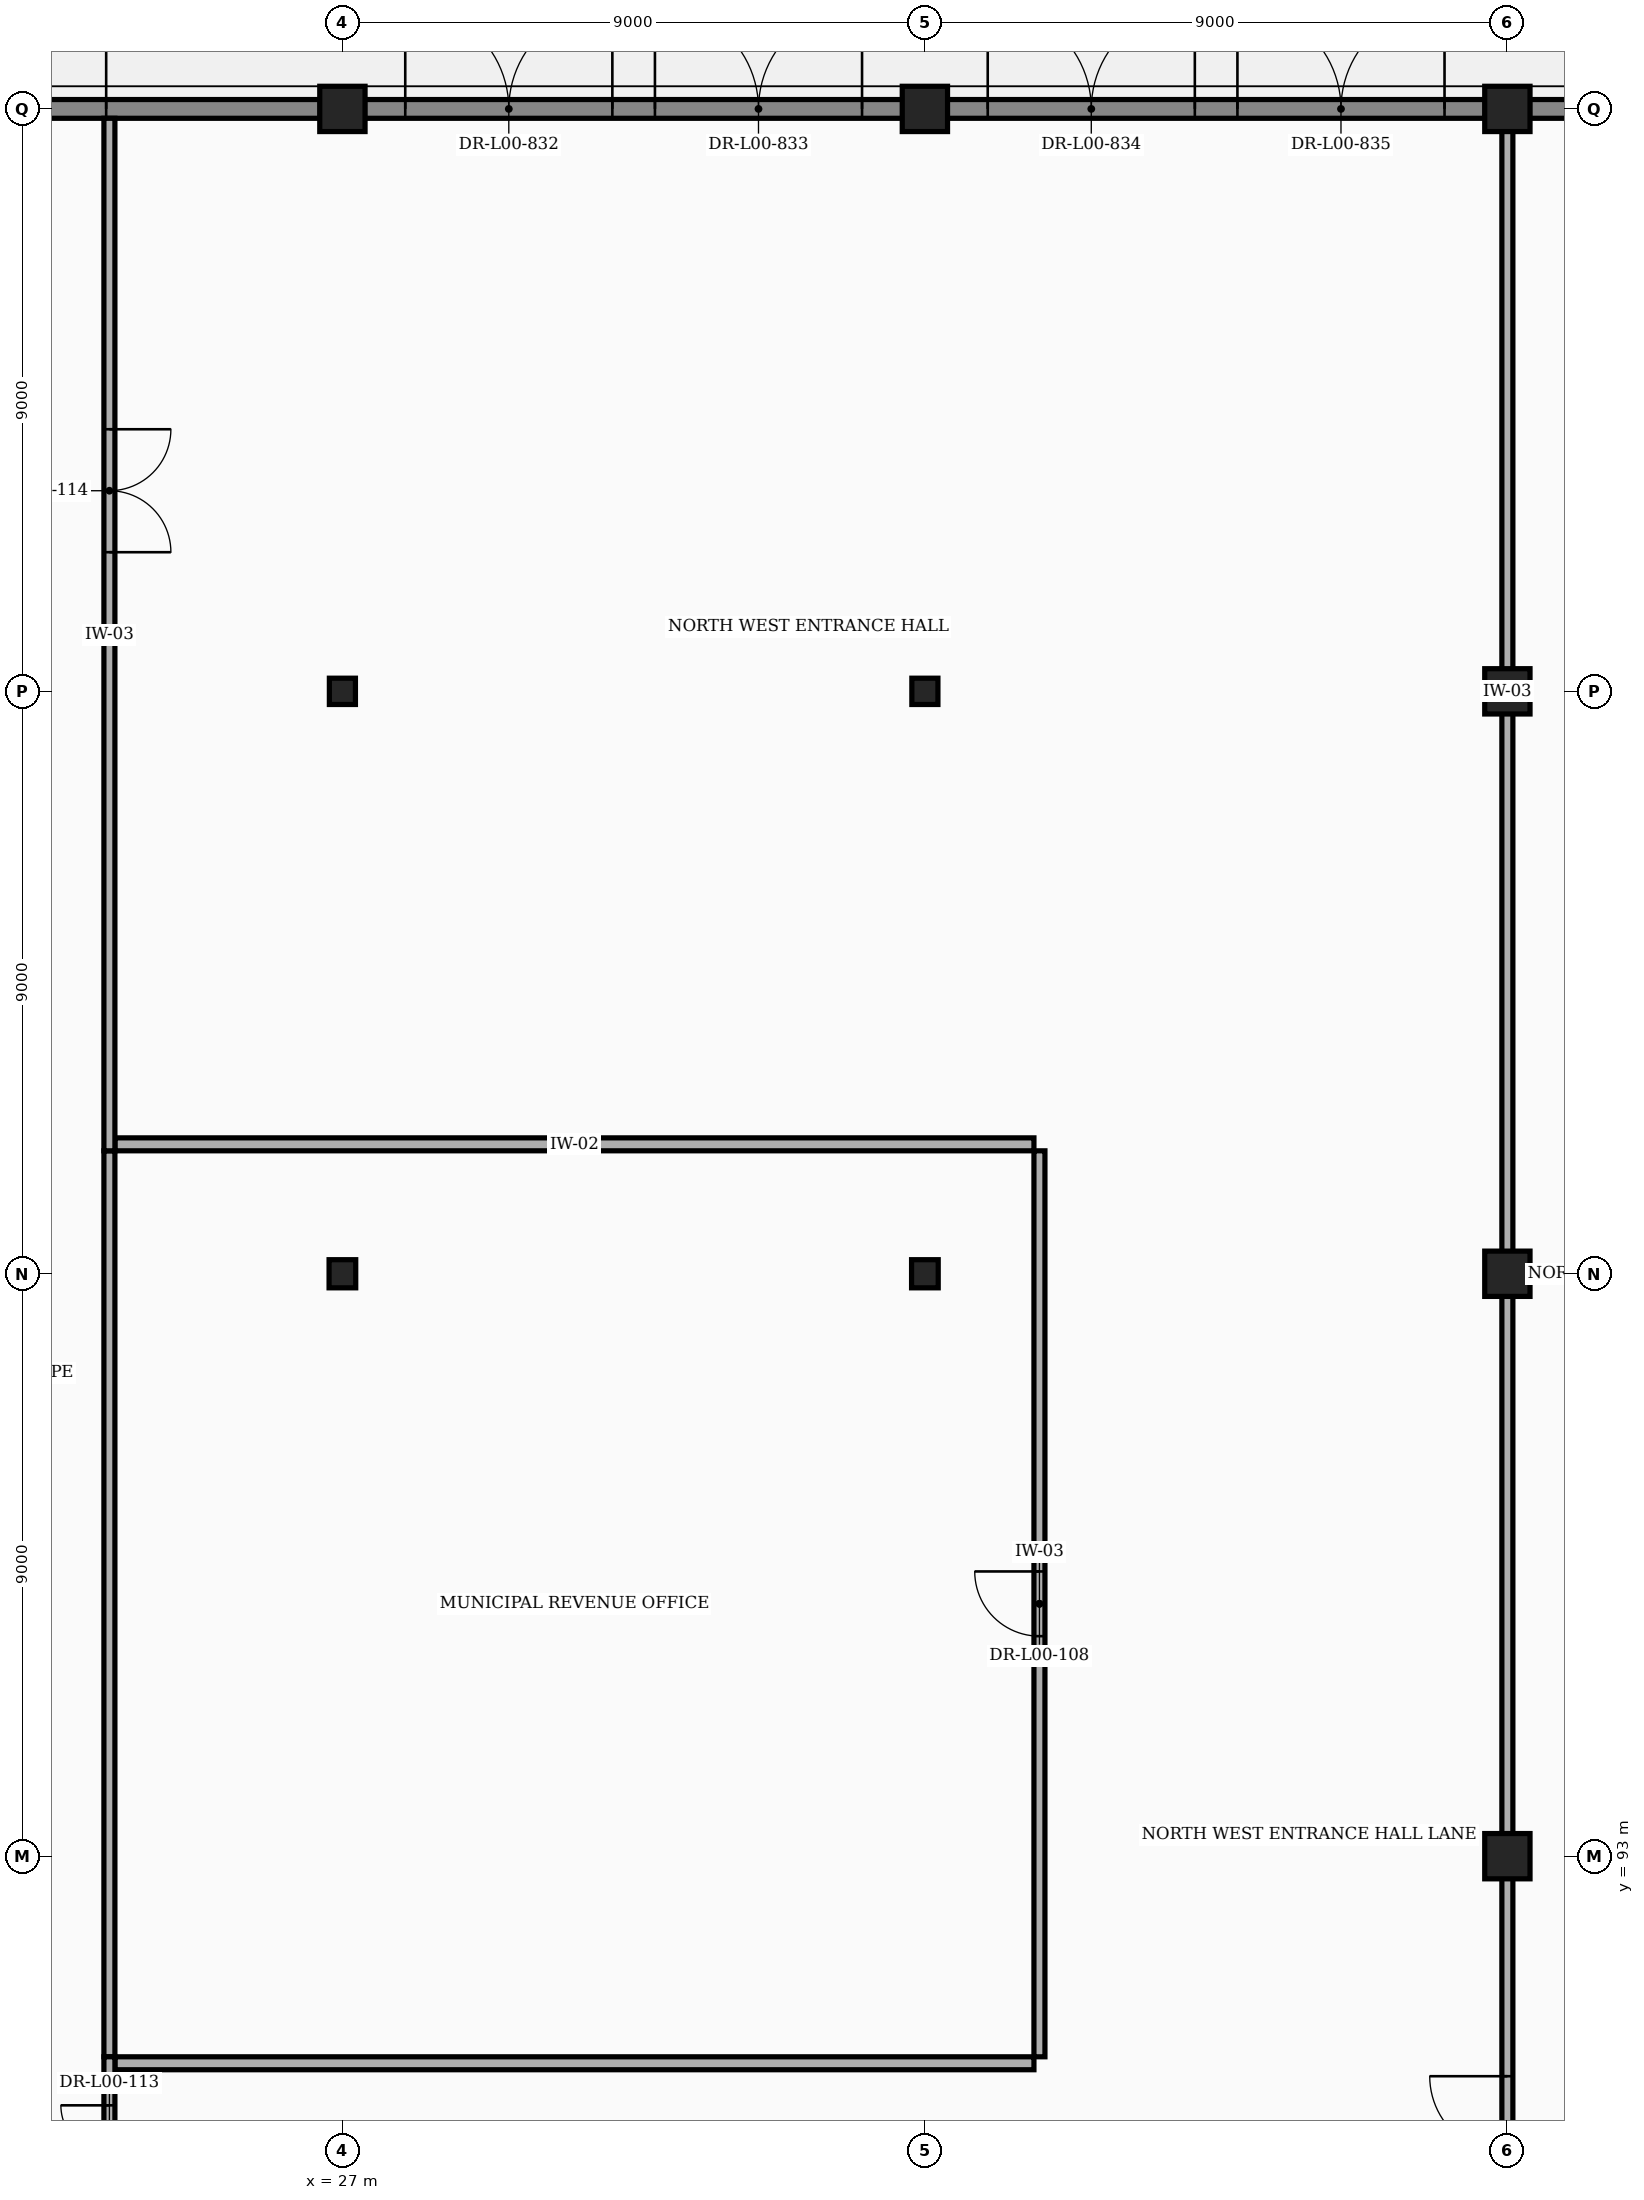
"""IFC4 building model, lengths in metres.
Left out: names, types, materials, properties, quantities, classifications, styles, units other than length and angle.
Written with IfcOpenShell. Run it as: python <this file> out.ifc"""

import sys

from ifc_helpers import new_model, si_unit, direction, frame, frame_2d, origin, origin_2d, place, context, subcontext, project, spatial, rectangle, i_section, extrude, element, fill, save


model = new_model("IFC4")
c1 = context("Model", 3, precision=1e-05, world=origin(), true_north=direction((0.0, 1.0)))
c2 = subcontext(c1, "Body", "Model", "MODEL_VIEW")
j1 = project(units=[si_unit("LENGTHUNIT", "METRE"), si_unit("PLANEANGLEUNIT", "RADIAN")], contexts=[c1])
p1 = place(None, origin())
s1 = spatial("IfcSite", under=j1, at=p1, CompositionType="ELEMENT")
p2 = place(p1, origin())
s2 = spatial("IfcBuilding", under=s1, at=p2, CompositionType="ELEMENT")
p3 = place(p2, origin())
s3 = spatial("IfcBuildingStorey", under=s2, at=p3, CompositionType="ELEMENT", Elevation=0.0)
p4 = place(p3, frame((27.0, 102.0, 0.0), z_axis=(0.0, 0.0, 1.0), x_axis=(1.0, 0.0, 0.0)))
e1 = element("IfcColumn", 1, at=p4, inside=s3, PredefinedType="COLUMN", context=c2, shape_type="SweptSolid", body=[
    extrude(i_section(OverallWidth=0.412, OverallDepth=0.435, WebThickness=0.036, FlangeThickness=0.058, at=origin_2d()), origin(), (0.0, 0.0, 1.0), 6.0),
])
p5 = place(p3, frame((27.0, 111.0, 0.0), z_axis=(0.0, 0.0, 1.0), x_axis=(1.0, 0.0, 0.0)))
e2 = element("IfcColumn", 2, at=p5, inside=s3, PredefinedType="COLUMN", context=c2, shape_type="SweptSolid", body=[
    extrude(i_section(OverallWidth=0.403, OverallDepth=0.406, WebThickness=0.027, FlangeThickness=0.043, at=origin_2d()), origin(), (0.0, 0.0, 1.0), 6.0),
])
p6 = place(p3, frame((27.0, 120.0, 0.0), z_axis=(0.0, 0.0, 1.0), x_axis=(1.0, 0.0, 0.0)))
e3 = element("IfcColumn", 3, at=p6, inside=s3, PredefinedType="COLUMN", context=c2, shape_type="SweptSolid", body=[
    extrude(rectangle(XDim=0.7, YDim=0.7, at=origin_2d()), origin(), (0.0, 0.0, 1.0), 6.0),
])
p7 = place(p3, frame((36.0, 102.0, 0.0), z_axis=(0.0, 0.0, 1.0), x_axis=(1.0, 0.0, 0.0)))
e4 = element("IfcColumn", 4, at=p7, inside=s3, PredefinedType="COLUMN", context=c2, shape_type="SweptSolid", body=[
    extrude(i_section(OverallWidth=0.412, OverallDepth=0.435, WebThickness=0.036, FlangeThickness=0.058, at=origin_2d()), origin(), (0.0, 0.0, 1.0), 6.0),
])
p8 = place(p3, frame((36.0, 111.0, 0.0), z_axis=(0.0, 0.0, 1.0), x_axis=(1.0, 0.0, 0.0)))
e5 = element("IfcColumn", 5, at=p8, inside=s3, PredefinedType="COLUMN", context=c2, shape_type="SweptSolid", body=[
    extrude(i_section(OverallWidth=0.403, OverallDepth=0.406, WebThickness=0.027, FlangeThickness=0.043, at=origin_2d()), origin(), (0.0, 0.0, 1.0), 6.0),
])
for number, where, z_axis, x_axis in (
    (6, (36.0, 120.0, 0.0), (0.0, 0.0, 1.0), (1.0, 0.0, 0.0)),
    (7, (45.0, 93.0, 0.0), (0.0, 0.0, 1.0), (1.0, 0.0, 0.0)),
    (8, (45.0, 102.0, 0.0), (0.0, 0.0, 1.0), (1.0, 0.0, 0.0)),
    (9, (45.0, 111.0, 0.0), (0.0, 0.0, 1.0), (1.0, 0.0, 0.0)),
    (10, (45.0, 120.0, 0.0), (0.0, 0.0, 1.0), (1.0, 0.0, 0.0)),
):
    element("IfcColumn", number, at=place(p3, frame(where, z_axis=z_axis, x_axis=x_axis)), inside=s3, PredefinedType="COLUMN", context=c2, shape_type="SweptSolid", body=[
        extrude(rectangle(XDim=0.7, YDim=0.7, at=origin_2d()), origin(), (0.0, 0.0, 1.0), 6.0),
    ])
p9 = place(p3, frame((9.342, 120.0, 0.0), z_axis=(0.0, 0.0, 1.0), x_axis=(1.0, 0.0, 0.0)))
e11 = element("IfcWall", 11, at=p9, inside=s3, PredefinedType="STANDARD", context=c2, shape_type="SweptSolid", body=[
    extrude(rectangle(XDim=17.316, YDim=0.29, at=frame_2d((8.658, 0.0))), origin(), (0.0, 0.0, 1.0), 4.988),
])
p10 = place(p9, frame((10.508, 0.0, 0.0)))
e12 = element("IfcOpeningElement", 12, at=p10, cuts=e11, PredefinedType="OPENING", context=c2, shape_type="SweptSolid", body=[
    extrude(rectangle(XDim=3.5, YDim=2.4, at=frame_2d((1.75, 1.2))), frame((0.0, 0.157, 0.0), z_axis=(0.0, -1.0, 0.0), x_axis=(1.0, 0.0, 0.0)), (0.0, 0.0, 1.0), 0.314),
])
p11 = place(p9, frame((0.65, 0.0, 0.85)))
e13 = element("IfcOpeningElement", 13, at=p11, cuts=e11, PredefinedType="OPENING", context=c2, shape_type="SweptSolid", body=[
    extrude(rectangle(XDim=3.0, YDim=2.6, at=frame_2d((1.5, 1.3))), frame((0.0, 0.157, 0.0), z_axis=(0.0, -1.0, 0.0), x_axis=(1.0, 0.0, 0.0)), (0.0, 0.0, 1.0), 0.314),
])
p12 = place(p3, frame((27.342, 120.0, 0.0), z_axis=(0.0, 0.0, 1.0), x_axis=(1.0, 0.0, 0.0)))
e14 = element("IfcWall", 14, at=p12, inside=s3, PredefinedType="STANDARD", context=c2, shape_type="SweptSolid", body=[
    extrude(rectangle(XDim=8.316, YDim=0.29, at=frame_2d((4.158, 0.0))), origin(), (0.0, 0.0, 1.0), 5.138),
])
p13 = place(p12, frame((0.629, 0.0, 0.0)))
e15 = element("IfcOpeningElement", 15, at=p13, cuts=e14, PredefinedType="OPENING", context=c2, shape_type="SweptSolid", body=[
    extrude(rectangle(XDim=3.2, YDim=2.4, at=frame_2d((1.6, 1.2))), frame((0.0, 0.157, 0.0), z_axis=(0.0, -1.0, 0.0), x_axis=(1.0, 0.0, 0.0)), (0.0, 0.0, 1.0), 0.314),
])
p14 = place(p12, frame((4.487, 0.0, 0.0)))
e16 = element("IfcOpeningElement", 16, at=p14, cuts=e14, PredefinedType="OPENING", context=c2, shape_type="SweptSolid", body=[
    extrude(rectangle(XDim=3.2, YDim=2.4, at=frame_2d((1.6, 1.2))), frame((0.0, 0.157, 0.0), z_axis=(0.0, -1.0, 0.0), x_axis=(1.0, 0.0, 0.0)), (0.0, 0.0, 1.0), 0.314),
])
p15 = place(p3, frame((36.342, 120.0, 0.0), z_axis=(0.0, 0.0, 1.0), x_axis=(1.0, 0.0, 0.0)))
e17 = element("IfcWall", 17, at=p15, inside=s3, PredefinedType="STANDARD", context=c2, shape_type="SweptSolid", body=[
    extrude(rectangle(XDim=8.316, YDim=0.29, at=frame_2d((4.158, 0.0))), origin(), (0.0, 0.0, 1.0), 5.138),
])
p16 = place(p15, frame((0.629, 0.0, 0.0)))
e18 = element("IfcOpeningElement", 18, at=p16, cuts=e17, PredefinedType="OPENING", context=c2, shape_type="SweptSolid", body=[
    extrude(rectangle(XDim=3.2, YDim=2.4, at=frame_2d((1.6, 1.2))), frame((0.0, 0.157, 0.0), z_axis=(0.0, -1.0, 0.0), x_axis=(1.0, 0.0, 0.0)), (0.0, 0.0, 1.0), 0.314),
])
p17 = place(p15, frame((4.487, 0.0, 0.0)))
e19 = element("IfcOpeningElement", 19, at=p17, cuts=e17, PredefinedType="OPENING", context=c2, shape_type="SweptSolid", body=[
    extrude(rectangle(XDim=3.2, YDim=2.4, at=frame_2d((1.6, 1.2))), frame((0.0, 0.157, 0.0), z_axis=(0.0, -1.0, 0.0), x_axis=(1.0, 0.0, 0.0)), (0.0, 0.0, 1.0), 0.314),
])
p18 = place(p3, frame((45.342, 120.0, 0.0), z_axis=(0.0, 0.0, 1.0), x_axis=(1.0, 0.0, 0.0)))
e20 = element("IfcWall", 20, at=p18, inside=s3, PredefinedType="STANDARD", context=c2, shape_type="SweptSolid", body=[
    extrude(rectangle(XDim=17.316, YDim=0.29, at=frame_2d((8.658, 0.0))), origin(), (0.0, 0.0, 1.0), 4.988),
])
p19 = place(p18, frame((4.736, 0.0, 0.0)))
e21 = element("IfcOpeningElement", 21, at=p19, cuts=e20, PredefinedType="OPENING", context=c2, shape_type="SweptSolid", body=[
    extrude(rectangle(XDim=3.0, YDim=2.4, at=frame_2d((1.5, 1.2))), frame((0.0, 0.157, 0.0), z_axis=(0.0, -1.0, 0.0), x_axis=(1.0, 0.0, 0.0)), (0.0, 0.0, 1.0), 0.314),
])
p20 = place(p18, frame((8.258, 0.0, 0.0)))
e22 = element("IfcOpeningElement", 22, at=p20, cuts=e20, PredefinedType="OPENING", context=c2, shape_type="SweptSolid", body=[
    extrude(rectangle(XDim=3.0, YDim=2.4, at=frame_2d((1.5, 1.2))), frame((0.0, 0.157, 0.0), z_axis=(0.0, -1.0, 0.0), x_axis=(1.0, 0.0, 0.0)), (0.0, 0.0, 1.0), 0.314),
])
p21 = place(p18, frame((12.93, 0.0, 0.0)))
e23 = element("IfcOpeningElement", 23, at=p21, cuts=e20, PredefinedType="OPENING", context=c2, shape_type="SweptSolid", body=[
    extrude(rectangle(XDim=3.0, YDim=2.4, at=frame_2d((1.5, 1.2))), frame((0.0, 0.157, 0.0), z_axis=(0.0, -1.0, 0.0), x_axis=(1.0, 0.0, 0.0)), (0.0, 0.0, 1.0), 0.314),
])
for number, where, z_axis, x_axis in (
    (24, (23.485, 89.8, 0.0), (0.0, 0.0, 1.0), (1.0, 0.0, 0.0)),
    (25, (23.485, 104.0, 0.0), (0.0, 0.0, 1.0), (1.0, 0.0, 0.0)),
):
    element("IfcWall", number, at=place(p3, frame(where, z_axis=z_axis, x_axis=x_axis)), inside=s3, PredefinedType="PARTITIONING", context=c2, shape_type="SweptSolid", body=[
        extrude(rectangle(XDim=14.2, YDim=0.2, at=frame_2d((7.1, 0.0))), origin(), (0.0, 0.0, 1.0), 5.75),
    ])
p22 = place(p3, frame((45.0, 84.22, 0.0), z_axis=(0.0, 0.0, 1.0), x_axis=(0.0, 1.0, 0.0)))
e26 = element("IfcWall", 26, at=p22, inside=s3, PredefinedType="PARTITIONING", context=c2, shape_type="SweptSolid", body=[
    extrude(rectangle(XDim=8.56, YDim=0.17, at=frame_2d((4.28, 0.0))), origin(), (0.0, 0.0, 1.0), 5.217),
])
p23 = place(p22, frame((2.98, 0.0, 0.0)))
e27 = element("IfcOpeningElement", 27, at=p23, cuts=e26, PredefinedType="OPENING", context=c2, shape_type="SweptSolid", body=[
    extrude(rectangle(XDim=2.4, YDim=2.2, at=frame_2d((1.2, 1.1))), frame((0.0, 0.097, 0.0), z_axis=(0.0, -1.0, 0.0), x_axis=(1.0, 0.0, 0.0)), (0.0, 0.0, 1.0), 0.194),
])
p24 = place(p3, frame((45.0, 93.22, 0.0), z_axis=(0.0, 0.0, 1.0), x_axis=(0.0, 1.0, 0.0)))
e28 = element("IfcWall", 28, at=p24, inside=s3, PredefinedType="PARTITIONING", context=c2, shape_type="SweptSolid", body=[
    extrude(rectangle(XDim=8.56, YDim=0.17, at=frame_2d((4.28, 0.0))), origin(), (0.0, 0.0, 1.0), 5.217),
])
p25 = place(p3, frame((45.0, 102.22, 0.0), z_axis=(0.0, 0.0, 1.0), x_axis=(0.0, 1.0, 0.0)))
e29 = element("IfcWall", 29, at=p25, inside=s3, PredefinedType="PARTITIONING", context=c2, shape_type="SweptSolid", body=[
    extrude(rectangle(XDim=17.56, YDim=0.17, at=frame_2d((8.78, 0.0))), origin(), (0.0, 0.0, 1.0), 5.217),
])
p26 = place(p3, frame((23.4, 89.9, 0.0), z_axis=(0.0, 0.0, 1.0), x_axis=(0.0, 1.0, 0.0)))
e30 = element("IfcWall", 30, at=p26, inside=s3, PredefinedType="PARTITIONING", context=c2, shape_type="SweptSolid", body=[
    extrude(rectangle(XDim=14.0, YDim=0.17, at=frame_2d((7.0, 0.0))), origin(), (0.0, 0.0, 1.0), 5.75),
])
p27 = place(p3, frame((37.77, 89.9, 0.0), z_axis=(0.0, 0.0, 1.0), x_axis=(0.0, 1.0, 0.0)))
e31 = element("IfcWall", 31, at=p27, inside=s3, PredefinedType="PARTITIONING", context=c2, shape_type="SweptSolid", body=[
    extrude(rectangle(XDim=14.0, YDim=0.17, at=frame_2d((7.0, 0.0))), origin(), (0.0, 0.0, 1.0), 5.75),
])
p28 = place(p27, frame((6.5, 0.0, 0.0)))
e32 = element("IfcOpeningElement", 32, at=p28, cuts=e31, PredefinedType="OPENING", context=c2, shape_type="SweptSolid", body=[
    extrude(rectangle(XDim=1.0, YDim=2.15, at=frame_2d((0.5, 1.075))), frame((0.0, 0.097, 0.0), z_axis=(0.0, -1.0, 0.0), x_axis=(1.0, 0.0, 0.0)), (0.0, 0.0, 1.0), 0.194),
])
p29 = place(p3, frame((23.4, 87.0, 0.0), z_axis=(0.0, 0.0, 1.0), x_axis=(0.0, 1.0, 0.0)))
e33 = element("IfcWall", 33, at=p29, inside=s3, PredefinedType="PARTITIONING", context=c2, shape_type="SweptSolid", body=[
    extrude(rectangle(XDim=2.9, YDim=0.17, at=frame_2d((1.45, 0.0))), origin(), (0.0, 0.0, 1.0), 5.75),
])
p30 = place(p29, frame((0.65, 0.0, 0.0)))
e34 = element("IfcOpeningElement", 34, at=p30, cuts=e33, PredefinedType="OPENING", context=c2, shape_type="SweptSolid", body=[
    extrude(rectangle(XDim=1.5, YDim=2.2, at=frame_2d((0.75, 1.1))), frame((0.0, 0.097, 0.0), z_axis=(0.0, -1.0, 0.0), x_axis=(1.0, 0.0, 0.0)), (0.0, 0.0, 1.0), 0.194),
])
p31 = place(p3, frame((23.4, 103.9, 0.0), z_axis=(0.0, 0.0, 1.0), x_axis=(0.0, 1.0, 0.0)))
e35 = element("IfcWall", 35, at=p31, inside=s3, PredefinedType="PARTITIONING", context=c2, shape_type="SweptSolid", body=[
    extrude(rectangle(XDim=15.955, YDim=0.17, at=frame_2d((7.978, 0.0))), origin(), (0.0, 0.0, 1.0), 5.75),
])
p32 = place(p31, frame((9.25, 0.0, 0.0)))
e36 = element("IfcOpeningElement", 36, at=p32, cuts=e35, PredefinedType="OPENING", context=c2, shape_type="SweptSolid", body=[
    extrude(rectangle(XDim=1.9, YDim=2.35, at=frame_2d((0.95, 1.175))), frame((0.0, 0.097, 0.0), z_axis=(0.0, -1.0, 0.0), x_axis=(1.0, 0.0, 0.0)), (0.0, 0.0, 1.0), 0.194),
])
p33 = place(p10, origin())
e37 = element("IfcDoor", 37, at=p33, inside=s3, OperationType="DOUBLE_DOOR_SINGLE_SWING", PredefinedType="DOOR", context=c2, shape_type="SweptSolid", body=[
    extrude(rectangle(XDim=3.5, YDim=2.4, at=frame_2d((1.75, 1.2))), frame((0.0, 0.025, 0.0), z_axis=(0.0, -1.0, 0.0), x_axis=(1.0, 0.0, 0.0)), (0.0, 0.0, 1.0), 0.05),
])
fill(e12, e37)
p34 = place(p13, origin())
e38 = element("IfcDoor", 38, at=p34, inside=s3, OperationType="DOUBLE_DOOR_SINGLE_SWING", PredefinedType="DOOR", context=c2, shape_type="SweptSolid", body=[
    extrude(rectangle(XDim=3.2, YDim=2.4, at=frame_2d((1.6, 1.2))), frame((0.0, 0.025, 0.0), z_axis=(0.0, -1.0, 0.0), x_axis=(1.0, 0.0, 0.0)), (0.0, 0.0, 1.0), 0.05),
])
fill(e15, e38)
p35 = place(p14, origin())
e39 = element("IfcDoor", 39, at=p35, inside=s3, OperationType="DOUBLE_DOOR_SINGLE_SWING", PredefinedType="DOOR", context=c2, shape_type="SweptSolid", body=[
    extrude(rectangle(XDim=3.2, YDim=2.4, at=frame_2d((1.6, 1.2))), frame((0.0, 0.025, 0.0), z_axis=(0.0, -1.0, 0.0), x_axis=(1.0, 0.0, 0.0)), (0.0, 0.0, 1.0), 0.05),
])
fill(e16, e39)
p36 = place(p16, origin())
e40 = element("IfcDoor", 40, at=p36, inside=s3, OperationType="DOUBLE_DOOR_SINGLE_SWING", PredefinedType="DOOR", context=c2, shape_type="SweptSolid", body=[
    extrude(rectangle(XDim=3.2, YDim=2.4, at=frame_2d((1.6, 1.2))), frame((0.0, 0.025, 0.0), z_axis=(0.0, -1.0, 0.0), x_axis=(1.0, 0.0, 0.0)), (0.0, 0.0, 1.0), 0.05),
])
fill(e18, e40)
p37 = place(p17, origin())
e41 = element("IfcDoor", 41, at=p37, inside=s3, OperationType="DOUBLE_DOOR_SINGLE_SWING", PredefinedType="DOOR", context=c2, shape_type="SweptSolid", body=[
    extrude(rectangle(XDim=3.2, YDim=2.4, at=frame_2d((1.6, 1.2))), frame((0.0, 0.025, 0.0), z_axis=(0.0, -1.0, 0.0), x_axis=(1.0, 0.0, 0.0)), (0.0, 0.0, 1.0), 0.05),
])
fill(e19, e41)
p38 = place(p23, origin())
e42 = element("IfcDoor", 42, at=p38, inside=s3, OperationType="DOUBLE_DOOR_SINGLE_SWING", PredefinedType="DOOR", context=c2, shape_type="SweptSolid", body=[
    extrude(rectangle(XDim=2.4, YDim=2.2, at=frame_2d((1.2, 1.1))), frame((0.0, 0.025, 0.0), z_axis=(0.0, -1.0, 0.0), x_axis=(1.0, 0.0, 0.0)), (0.0, 0.0, 1.0), 0.05),
])
fill(e27, e42)
p39 = place(p28, origin())
e43 = element("IfcDoor", 43, at=p39, inside=s3, OperationType="SINGLE_SWING_RIGHT", PredefinedType="DOOR", context=c2, shape_type="SweptSolid", body=[
    extrude(rectangle(XDim=1.0, YDim=2.15, at=frame_2d((0.5, 1.075))), frame((0.0, 0.025, 0.0), z_axis=(0.0, -1.0, 0.0), x_axis=(1.0, 0.0, 0.0)), (0.0, 0.0, 1.0), 0.05),
])
fill(e32, e43)
p40 = place(p30, origin())
e44 = element("IfcDoor", 44, at=p40, inside=s3, OperationType="DOUBLE_DOOR_SINGLE_SWING", PredefinedType="DOOR", context=c2, shape_type="SweptSolid", body=[
    extrude(rectangle(XDim=1.5, YDim=2.2, at=frame_2d((0.75, 1.1))), frame((0.0, 0.025, 0.0), z_axis=(0.0, -1.0, 0.0), x_axis=(1.0, 0.0, 0.0)), (0.0, 0.0, 1.0), 0.05),
])
fill(e34, e44)
p41 = place(p32, frame((1.9, 0.0, 0.0), z_axis=(0.0, 0.0, 1.0), x_axis=(-1.0, 0.0, 0.0)))
e45 = element("IfcDoor", 45, at=p41, inside=s3, OperationType="DOUBLE_DOOR_SINGLE_SWING", PredefinedType="DOOR", context=c2, shape_type="SweptSolid", body=[
    extrude(rectangle(XDim=1.9, YDim=2.35, at=frame_2d((0.95, 1.175))), frame((0.0, 0.025, 0.0), z_axis=(0.0, -1.0, 0.0), x_axis=(1.0, 0.0, 0.0)), (0.0, 0.0, 1.0), 0.05),
])
fill(e36, e45)
save(model, sys.argv[1])
